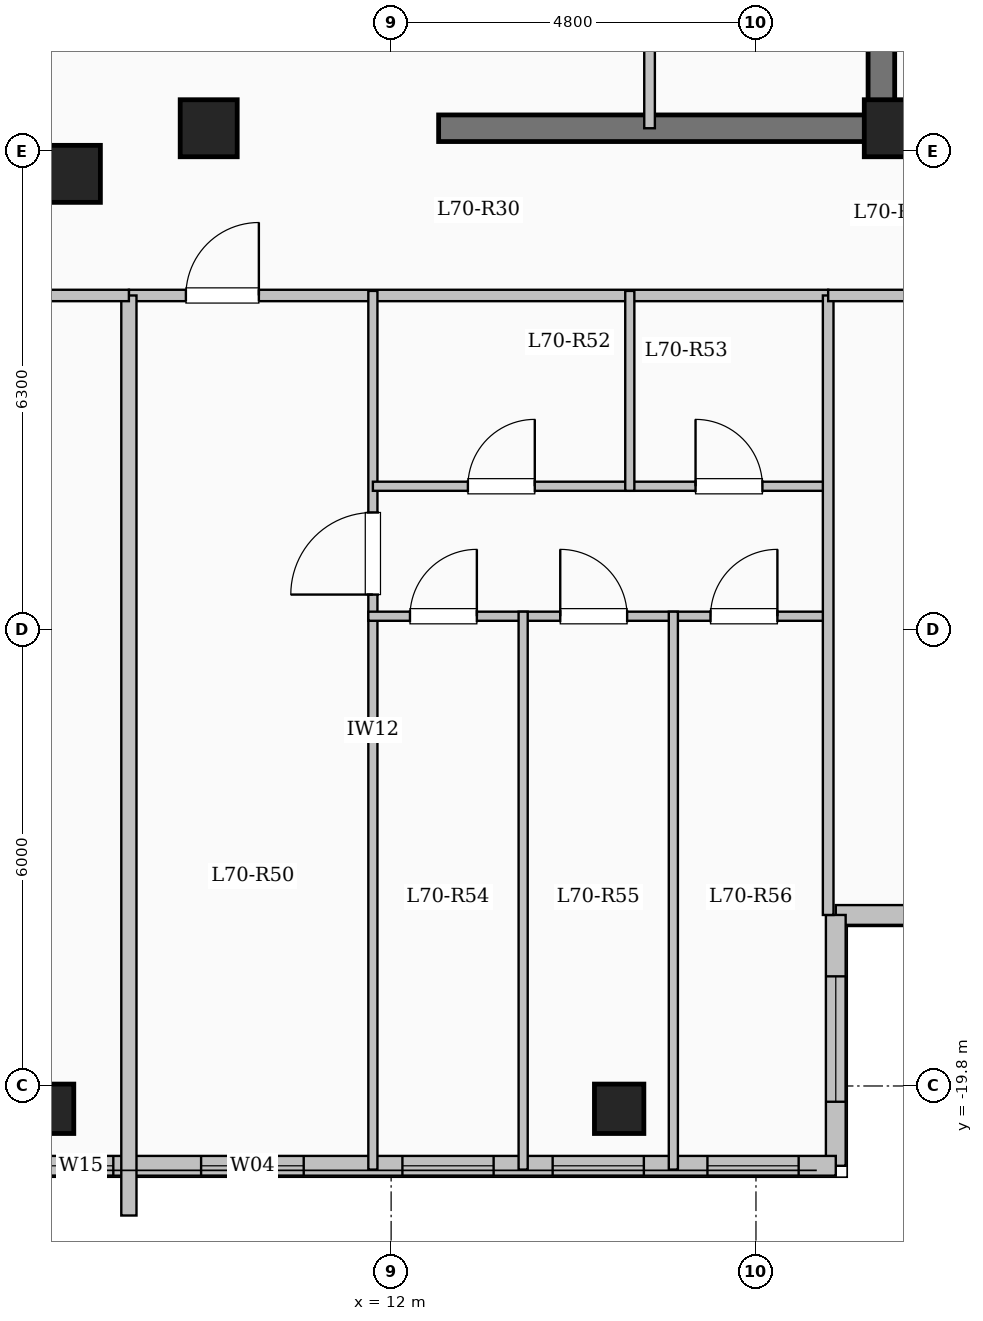
"""IFC4 building model, lengths in metres.
Left out: names, types, materials, properties, quantities, classifications, styles, units other than length and angle.
Written with IfcOpenShell. Run it as: python <this file> out.ifc"""

import sys

from ifc_helpers import new_model, si_unit, direction, frame, frame_2d, origin, origin_2d, place, context, subcontext, project, spatial, rectangle, extrude, element, fill, save


model = new_model("IFC4")
c1 = context("Model", 3, precision=1e-05, world=origin(), true_north=direction((0.0, 1.0)))
c2 = subcontext(c1, "Body", "Model", "MODEL_VIEW")
j1 = project(units=[si_unit("LENGTHUNIT", "METRE"), si_unit("PLANEANGLEUNIT", "RADIAN")], contexts=[c1])
p1 = place(None, origin())
s1 = spatial("IfcSite", under=j1, at=p1, CompositionType="ELEMENT")
p2 = place(p1, origin())
s2 = spatial("IfcBuilding", under=s1, at=p2, CompositionType="ELEMENT")
p3 = place(p2, frame((0.0, 0.0, 258.25)))
s3 = spatial("IfcBuildingStorey", under=s2, at=p3, CompositionType="ELEMENT", Elevation=258.25)
for number, where, z_axis, x_axis in (
    (1, (7.8, -7.8, 0.0), (0.0, 0.0, 1.0), (1.0, 0.0, 0.0)),
    (2, (9.6, -7.2, 0.0), (0.0, 0.0, 1.0), (1.0, 0.0, 0.0)),
    (3, (18.6, -7.2, 0.0), (0.0, 0.0, 1.0), (1.0, 0.0, 0.0)),
):
    element("IfcColumn", number, at=place(p3, frame(where, z_axis=z_axis, x_axis=x_axis)), inside=s3, PredefinedType="COLUMN", context=c2, shape_type="SweptSolid", body=[
        extrude(rectangle(XDim=0.75, YDim=0.75, at=origin_2d()), origin(), (0.0, 0.0, 1.0), 3.35),
    ])
for number, where, z_axis, x_axis in (
    (4, (7.5, -20.1, 0.0), (0.0, 0.0, 1.0), (1.0, 0.0, 0.0)),
    (5, (15.0, -20.1, 0.0), (0.0, 0.0, 1.0), (1.0, 0.0, 0.0)),
):
    element("IfcColumn", number, at=place(p3, frame(where, z_axis=z_axis, x_axis=x_axis)), inside=s3, PredefinedType="COLUMN", context=c2, shape_type="SweptSolid", body=[
        extrude(rectangle(XDim=0.65, YDim=0.65, at=origin_2d()), origin(), (0.0, 0.0, 1.0), 3.35),
    ])
p4 = place(p3, frame((22.65, -17.55, 0.0), z_axis=(0.0, 0.0, 1.0), x_axis=(-1.0, 0.0, 0.0)))
e6 = element("IfcWall", 6, at=p4, inside=s3, PredefinedType="SOLIDWALL", context=c2, shape_type="SweptSolid", body=[
    extrude(rectangle(XDim=4.8, YDim=0.26, at=frame_2d((2.4, 0.0))), origin(), (0.0, 0.0, 1.0), 3.1),
])
p5 = place(p4, frame((1.325, 0.0, 0.9)))
e7 = element("IfcOpeningElement", 7, at=p5, cuts=e6, PredefinedType="OPENING", context=c2, shape_type="SweptSolid", body=[
    extrude(rectangle(XDim=2.2, YDim=1.75, at=frame_2d((1.1, 0.875))), frame((0.0, 0.14, 0.0), z_axis=(0.0, -1.0, 0.0), x_axis=(1.0, 0.0, 0.0)), (0.0, 0.0, 1.0), 0.28),
])
p6 = place(p3, frame((17.85, -17.55, 0.0), z_axis=(0.0, 0.0, 1.0), x_axis=(0.0, -1.0, 0.0)))
e8 = element("IfcWall", 8, at=p6, inside=s3, PredefinedType="SOLIDWALL", context=c2, shape_type="SweptSolid", body=[
    extrude(rectangle(XDim=3.3, YDim=0.26, at=frame_2d((1.65, 0.0))), origin(), (0.0, 0.0, 1.0), 3.1),
])
p7 = place(p6, frame((0.808, 0.0, 0.9)))
e9 = element("IfcOpeningElement", 9, at=p7, cuts=e8, PredefinedType="OPENING", context=c2, shape_type="SweptSolid", body=[
    extrude(rectangle(XDim=1.65, YDim=1.6, at=frame_2d((0.825, 0.8))), frame((0.0, 0.14, 0.0), z_axis=(0.0, -1.0, 0.0), x_axis=(1.0, 0.0, 0.0)), (0.0, 0.0, 1.0), 0.28),
])
p8 = place(p3, frame((17.85, -20.85, 0.0), z_axis=(0.0, 0.0, 1.0), x_axis=(-1.0, 0.0, 0.0)))
e10 = element("IfcWall", 10, at=p8, inside=s3, PredefinedType="SOLIDWALL", context=c2, shape_type="SweptSolid", body=[
    extrude(rectangle(XDim=10.5, YDim=0.26, at=frame_2d((5.25, 0.0))), origin(), (0.0, 0.0, 1.0), 3.1),
])
p9 = place(p8, frame((0.489, 0.0, 0.95)))
e11 = element("IfcOpeningElement", 11, at=p9, cuts=e10, PredefinedType="OPENING", context=c2, shape_type="SweptSolid", body=[
    extrude(rectangle(XDim=1.2, YDim=1.5, at=frame_2d((0.6, 0.75))), frame((0.0, 0.14, 0.0), z_axis=(0.0, -1.0, 0.0), x_axis=(1.0, 0.0, 0.0)), (0.0, 0.0, 1.0), 0.28),
])
p10 = place(p8, frame((2.525, 0.0, 0.95)))
e12 = element("IfcOpeningElement", 12, at=p10, cuts=e10, PredefinedType="OPENING", context=c2, shape_type="SweptSolid", body=[
    extrude(rectangle(XDim=1.2, YDim=1.5, at=frame_2d((0.6, 0.75))), frame((0.0, 0.14, 0.0), z_axis=(0.0, -1.0, 0.0), x_axis=(1.0, 0.0, 0.0)), (0.0, 0.0, 1.0), 0.28),
])
p11 = place(p8, frame((4.501, 0.0, 0.95)))
e13 = element("IfcOpeningElement", 13, at=p11, cuts=e10, PredefinedType="OPENING", context=c2, shape_type="SweptSolid", body=[
    extrude(rectangle(XDim=1.2, YDim=1.5, at=frame_2d((0.6, 0.75))), frame((0.0, 0.14, 0.0), z_axis=(0.0, -1.0, 0.0), x_axis=(1.0, 0.0, 0.0)), (0.0, 0.0, 1.0), 0.28),
])
p12 = place(p8, frame((7.0, 0.0, 0.95)))
e14 = element("IfcOpeningElement", 14, at=p12, cuts=e10, PredefinedType="OPENING", context=c2, shape_type="SweptSolid", body=[
    extrude(rectangle(XDim=1.35, YDim=1.55, at=frame_2d((0.675, 0.775))), frame((0.0, 0.14, 0.0), z_axis=(0.0, -1.0, 0.0), x_axis=(1.0, 0.0, 0.0)), (0.0, 0.0, 1.0), 0.28),
])
p13 = place(p8, frame((9.505, 0.0, 0.95)))
e15 = element("IfcOpeningElement", 15, at=p13, cuts=e10, PredefinedType="OPENING", context=c2, shape_type="SweptSolid", body=[
    extrude(rectangle(XDim=0.85, YDim=1.5, at=frame_2d((0.425, 0.75))), frame((0.0, 0.14, 0.0), z_axis=(0.0, -1.0, 0.0), x_axis=(1.0, 0.0, 0.0)), (0.0, 0.0, 1.0), 0.28),
])
p14 = place(p3, frame((18.45, -7.375, 0.0), z_axis=(0.0, 0.0, 1.0), x_axis=(0.0, 1.0, 0.0)))
e16 = element("IfcWall", 16, at=p14, inside=s3, PredefinedType="SHEAR", context=c2, shape_type="SweptSolid", body=[
    extrude(rectangle(XDim=14.05, YDim=0.35, at=frame_2d((7.025, 0.0))), origin(), (0.0, 0.0, 1.0), 3.35),
])
p15 = place(p3, frame((12.625, -7.2, 0.0), z_axis=(0.0, 0.0, 1.0), x_axis=(1.0, 0.0, 0.0)))
e17 = element("IfcWall", 17, at=p15, inside=s3, PredefinedType="SHEAR", context=c2, shape_type="SweptSolid", body=[
    extrude(rectangle(XDim=6.0, YDim=0.35, at=frame_2d((3.0, 0.0))), origin(), (0.0, 0.0, 1.0), 3.35),
])
p16 = place(p3, frame((15.4, -7.2, 0.0), z_axis=(0.0, 0.0, 1.0), x_axis=(0.0, 1.0, 0.0)))
e18 = element("IfcWall", 18, at=p16, inside=s3, PredefinedType="PARTITIONING", context=c2, shape_type="SweptSolid", body=[
    extrude(rectangle(XDim=10.45, YDim=0.14, at=frame_2d((5.225, 0.0))), origin(), (0.0, 0.0, 1.0), 3.1),
])
p17 = place(p16, frame((9.25, 0.0, 0.0)))
e19 = element("IfcOpeningElement", 19, at=p17, cuts=e18, PredefinedType="OPENING", context=c2, shape_type="SweptSolid", body=[
    extrude(rectangle(XDim=0.9, YDim=2.08, at=frame_2d((0.45, 1.04))), frame((0.0, 0.08, 0.0), z_axis=(0.0, -1.0, 0.0), x_axis=(1.0, 0.0, 0.0)), (0.0, 0.0, 1.0), 0.16),
])
p18 = place(p3, frame((8.55, -9.4, 0.0), z_axis=(0.0, 0.0, 1.0), x_axis=(1.0, 0.0, 0.0)))
e20 = element("IfcWall", 20, at=p18, inside=s3, PredefinedType="PARTITIONING", context=c2, shape_type="SweptSolid", body=[
    extrude(rectangle(XDim=9.2, YDim=0.15, at=frame_2d((4.6, 0.0))), origin(), (0.0, 0.0, 1.0), 3.1),
])
p19 = place(p18, frame((0.75, 0.0, 0.0)))
e21 = element("IfcOpeningElement", 21, at=p19, cuts=e20, PredefinedType="OPENING", context=c2, shape_type="SweptSolid", body=[
    extrude(rectangle(XDim=0.96, YDim=2.15, at=frame_2d((0.48, 1.075))), frame((0.0, 0.085, 0.0), z_axis=(0.0, -1.0, 0.0), x_axis=(1.0, 0.0, 0.0)), (0.0, 0.0, 1.0), 0.17),
])
p20 = place(p3, frame((11.76, -20.9, 0.0), z_axis=(0.0, 0.0, 1.0), x_axis=(0.0, 1.0, 0.0)))
e22 = element("IfcWall", 22, at=p20, inside=s3, PredefinedType="PARTITIONING", context=c2, shape_type="SweptSolid", body=[
    extrude(rectangle(XDim=11.56, YDim=0.12, at=frame_2d((5.78, 0.0))), origin(), (0.0, 0.0, 1.0), 3.1),
])
p21 = place(p20, frame((7.565, 0.0, 0.0)))
e23 = element("IfcOpeningElement", 23, at=p21, cuts=e22, PredefinedType="OPENING", context=c2, shape_type="SweptSolid", body=[
    extrude(rectangle(XDim=1.08, YDim=2.15, at=frame_2d((0.54, 1.075))), frame((0.0, 0.07, 0.0), z_axis=(0.0, -1.0, 0.0), x_axis=(1.0, 0.0, 0.0)), (0.0, 0.0, 1.0), 0.14),
])
p22 = place(p3, frame((11.76, -11.91, 0.0), z_axis=(0.0, 0.0, 1.0), x_axis=(1.0, 0.0, 0.0)))
e24 = element("IfcWall", 24, at=p22, inside=s3, PredefinedType="PARTITIONING", context=c2, shape_type="SweptSolid", body=[
    extrude(rectangle(XDim=3.38, YDim=0.12, at=frame_2d((1.69, 0.0))), origin(), (0.0, 0.0, 1.0), 3.1),
])
p23 = place(p22, frame((1.25, 0.0, 0.0)))
e25 = element("IfcOpeningElement", 25, at=p23, cuts=e24, PredefinedType="OPENING", context=c2, shape_type="SweptSolid", body=[
    extrude(rectangle(XDim=0.88, YDim=2.1, at=frame_2d((0.44, 1.05))), frame((0.0, 0.07, 0.0), z_axis=(0.0, -1.0, 0.0), x_axis=(1.0, 0.0, 0.0)), (0.0, 0.0, 1.0), 0.14),
])
p24 = place(p3, frame((15.14, -11.91, 0.0), z_axis=(0.0, 0.0, 1.0), x_axis=(1.0, 0.0, 0.0)))
e26 = element("IfcWall", 26, at=p24, inside=s3, PredefinedType="PARTITIONING", context=c2, shape_type="SweptSolid", body=[
    extrude(rectangle(XDim=2.61, YDim=0.12, at=frame_2d((1.305, 0.0))), origin(), (0.0, 0.0, 1.0), 3.1),
])
p25 = place(p24, frame((0.865, 0.0, 0.0)))
e27 = element("IfcOpeningElement", 27, at=p25, cuts=e26, PredefinedType="OPENING", context=c2, shape_type="SweptSolid", body=[
    extrude(rectangle(XDim=0.88, YDim=2.1, at=frame_2d((0.44, 1.05))), frame((0.0, 0.07, 0.0), z_axis=(0.0, -1.0, 0.0), x_axis=(1.0, 0.0, 0.0)), (0.0, 0.0, 1.0), 0.14),
])
p26 = place(p3, frame((11.7, -13.62, 0.0), z_axis=(0.0, 0.0, 1.0), x_axis=(1.0, 0.0, 0.0)))
e28 = element("IfcWall", 28, at=p26, inside=s3, PredefinedType="PARTITIONING", context=c2, shape_type="SweptSolid", body=[
    extrude(rectangle(XDim=6.11, YDim=0.12, at=frame_2d((3.055, 0.0))), origin(), (0.0, 0.0, 1.0), 3.1),
])
p27 = place(p26, frame((0.548, 0.0, 0.0)))
e29 = element("IfcOpeningElement", 29, at=p27, cuts=e28, PredefinedType="OPENING", context=c2, shape_type="SweptSolid", body=[
    extrude(rectangle(XDim=0.88, YDim=2.1, at=frame_2d((0.44, 1.05))), frame((0.0, 0.07, 0.0), z_axis=(0.0, -1.0, 0.0), x_axis=(1.0, 0.0, 0.0)), (0.0, 0.0, 1.0), 0.14),
])
p28 = place(p26, frame((2.525, 0.0, 0.0)))
e30 = element("IfcOpeningElement", 30, at=p28, cuts=e28, PredefinedType="OPENING", context=c2, shape_type="SweptSolid", body=[
    extrude(rectangle(XDim=0.88, YDim=2.1, at=frame_2d((0.44, 1.05))), frame((0.0, 0.07, 0.0), z_axis=(0.0, -1.0, 0.0), x_axis=(1.0, 0.0, 0.0)), (0.0, 0.0, 1.0), 0.14),
])
p29 = place(p26, frame((4.502, 0.0, 0.0)))
e31 = element("IfcOpeningElement", 31, at=p29, cuts=e28, PredefinedType="OPENING", context=c2, shape_type="SweptSolid", body=[
    extrude(rectangle(XDim=0.88, YDim=2.1, at=frame_2d((0.44, 1.05))), frame((0.0, 0.07, 0.0), z_axis=(0.0, -1.0, 0.0), x_axis=(1.0, 0.0, 0.0)), (0.0, 0.0, 1.0), 0.14),
])
p30 = place(p3, frame((15.14, -11.97, 0.0), z_axis=(0.0, 0.0, 1.0), x_axis=(0.0, 1.0, 0.0)))
e32 = element("IfcWall", 32, at=p30, inside=s3, PredefinedType="PARTITIONING", context=c2, shape_type="SweptSolid", body=[
    extrude(rectangle(XDim=2.63, YDim=0.12, at=frame_2d((1.315, 0.0))), origin(), (0.0, 0.0, 1.0), 2.685),
])
for number, where, z_axis, x_axis in (
    (33, (13.737, -20.9, 0.0), (0.0, 0.0, 1.0), (0.0, 1.0, 0.0)),
    (34, (15.713, -20.9, 0.0), (0.0, 0.0, 1.0), (0.0, 1.0, 0.0)),
):
    element("IfcWall", number, at=place(p3, frame(where, z_axis=z_axis, x_axis=x_axis)), inside=s3, PredefinedType="PARTITIONING", context=c2, shape_type="SweptSolid", body=[
        extrude(rectangle(XDim=7.34, YDim=0.12, at=frame_2d((3.67, 0.0))), origin(), (0.0, 0.0, 1.0), 3.1),
    ])
p31 = place(p3, frame((8.55, -21.504, 0.0), z_axis=(0.0, 0.0, 1.0), x_axis=(0.0, 1.0, 0.0)))
e35 = element("IfcWall", 35, at=p31, inside=s3, PredefinedType="SOLIDWALL", context=c2, shape_type="SweptSolid", body=[
    extrude(rectangle(XDim=12.104, YDim=0.2, at=frame_2d((6.052, 0.0))), origin(), (0.0, 0.0, 1.0), 3.1),
])
p32 = place(p3, frame((-8.55, -9.4, 0.0), z_axis=(0.0, 0.0, 1.0), x_axis=(1.0, 0.0, 0.0)))
e36 = element("IfcWall", 36, at=p32, inside=s3, PredefinedType="PARTITIONING", context=c2, shape_type="SweptSolid", body=[
    extrude(rectangle(XDim=17.1, YDim=0.15, at=frame_2d((8.55, 0.0))), origin(), (0.0, 0.0, 1.0), 3.1),
])
p33 = place(p32, frame((1.75, 0.0, 0.0)))
e37 = element("IfcOpeningElement", 37, at=p33, cuts=e36, PredefinedType="OPENING", context=c2, shape_type="SweptSolid", body=[
    extrude(rectangle(XDim=0.95, YDim=2.15, at=frame_2d((0.475, 1.075))), frame((0.0, 0.085, 0.0), z_axis=(0.0, -1.0, 0.0), x_axis=(1.0, 0.0, 0.0)), (0.0, 0.0, 1.0), 0.17),
])
p34 = place(p32, frame((10.5, 0.0, 0.0)))
e38 = element("IfcOpeningElement", 38, at=p34, cuts=e36, PredefinedType="OPENING", context=c2, shape_type="SweptSolid", body=[
    extrude(rectangle(XDim=0.95, YDim=2.15, at=frame_2d((0.475, 1.075))), frame((0.0, 0.085, 0.0), z_axis=(0.0, -1.0, 0.0), x_axis=(1.0, 0.0, 0.0)), (0.0, 0.0, 1.0), 0.17),
])
p35 = place(p3, frame((18.45, -7.25, 0.0), z_axis=(0.0, 0.0, 1.0), x_axis=(1.0, 0.0, 0.0)))
e39 = element("IfcWall", 39, at=p35, inside=s3, PredefinedType="PARTITIONING", context=c2, shape_type="SweptSolid", body=[
    extrude(rectangle(XDim=4.23, YDim=0.15, at=frame_2d((2.115, 0.0))), origin(), (0.0, 0.0, 1.0), 3.1),
])
p36 = place(p35, frame((1.5, 0.0, 0.0)))
e40 = element("IfcOpeningElement", 40, at=p36, cuts=e39, PredefinedType="OPENING", context=c2, shape_type="SweptSolid", body=[
    extrude(rectangle(XDim=1.08, YDim=2.15, at=frame_2d((0.54, 1.075))), frame((0.0, 0.085, 0.0), z_axis=(0.0, -1.0, 0.0), x_axis=(1.0, 0.0, 0.0)), (0.0, 0.0, 1.0), 0.17),
])
p37 = place(p3, frame((17.75, -17.55, 0.0), z_axis=(0.0, 0.0, 1.0), x_axis=(0.0, 1.0, 0.0)))
e41 = element("IfcWall", 41, at=p37, inside=s3, PredefinedType="PARTITIONING", context=c2, shape_type="SweptSolid", body=[
    extrude(rectangle(XDim=8.15, YDim=0.14, at=frame_2d((4.075, 0.0))), origin(), (0.0, 0.0, 1.0), 3.1),
])
p38 = place(p3, frame((17.75, -9.4, 0.0), z_axis=(0.0, 0.0, 1.0), x_axis=(1.0, 0.0, 0.0)))
e42 = element("IfcWall", 42, at=p38, inside=s3, PredefinedType="PARTITIONING", context=c2, shape_type="SweptSolid", body=[
    extrude(rectangle(XDim=4.93, YDim=0.15, at=frame_2d((2.465, 0.0))), origin(), (0.0, 0.0, 1.0), 3.1),
])
p39 = place(p38, frame((1.99, 0.0, 0.0)))
e43 = element("IfcOpeningElement", 43, at=p39, cuts=e42, PredefinedType="OPENING", context=c2, shape_type="SweptSolid", body=[
    extrude(rectangle(XDim=0.95, YDim=2.15, at=frame_2d((0.475, 1.075))), frame((0.0, 0.085, 0.0), z_axis=(0.0, -1.0, 0.0), x_axis=(1.0, 0.0, 0.0)), (0.0, 0.0, 1.0), 0.17),
])
p40 = place(p7, origin())
e44 = element("IfcWindow", 44, at=p40, inside=s3, PartitioningType="SINGLE_PANEL", PredefinedType="WINDOW", context=c2, shape_type="SweptSolid", body=[
    extrude(rectangle(XDim=1.65, YDim=1.6, at=frame_2d((0.825, 0.8))), frame((0.0, 0.03, 0.0), z_axis=(0.0, -1.0, 0.0), x_axis=(1.0, 0.0, 0.0)), (0.0, 0.0, 1.0), 0.06),
])
fill(e9, e44)
p41 = place(p9, origin())
e45 = element("IfcWindow", 45, at=p41, inside=s3, PartitioningType="SINGLE_PANEL", PredefinedType="WINDOW", context=c2, shape_type="SweptSolid", body=[
    extrude(rectangle(XDim=1.2, YDim=1.5, at=frame_2d((0.6, 0.75))), frame((0.0, 0.03, 0.0), z_axis=(0.0, -1.0, 0.0), x_axis=(1.0, 0.0, 0.0)), (0.0, 0.0, 1.0), 0.06),
])
fill(e11, e45)
p42 = place(p10, origin())
e46 = element("IfcWindow", 46, at=p42, inside=s3, PartitioningType="SINGLE_PANEL", PredefinedType="WINDOW", context=c2, shape_type="SweptSolid", body=[
    extrude(rectangle(XDim=1.2, YDim=1.5, at=frame_2d((0.6, 0.75))), frame((0.0, 0.03, 0.0), z_axis=(0.0, -1.0, 0.0), x_axis=(1.0, 0.0, 0.0)), (0.0, 0.0, 1.0), 0.06),
])
fill(e12, e46)
p43 = place(p11, origin())
e47 = element("IfcWindow", 47, at=p43, inside=s3, PartitioningType="SINGLE_PANEL", PredefinedType="WINDOW", context=c2, shape_type="SweptSolid", body=[
    extrude(rectangle(XDim=1.2, YDim=1.5, at=frame_2d((0.6, 0.75))), frame((0.0, 0.03, 0.0), z_axis=(0.0, -1.0, 0.0), x_axis=(1.0, 0.0, 0.0)), (0.0, 0.0, 1.0), 0.06),
])
fill(e13, e47)
p44 = place(p12, origin())
e48 = element("IfcWindow", 48, at=p44, inside=s3, PartitioningType="SINGLE_PANEL", PredefinedType="WINDOW", context=c2, shape_type="SweptSolid", body=[
    extrude(rectangle(XDim=1.35, YDim=1.55, at=frame_2d((0.675, 0.775))), frame((0.0, 0.03, 0.0), z_axis=(0.0, -1.0, 0.0), x_axis=(1.0, 0.0, 0.0)), (0.0, 0.0, 1.0), 0.06),
])
fill(e14, e48)
p45 = place(p13, origin())
e49 = element("IfcWindow", 49, at=p45, inside=s3, PartitioningType="SINGLE_PANEL", PredefinedType="WINDOW", context=c2, shape_type="SweptSolid", body=[
    extrude(rectangle(XDim=0.85, YDim=1.5, at=frame_2d((0.425, 0.75))), frame((0.0, 0.03, 0.0), z_axis=(0.0, -1.0, 0.0), x_axis=(1.0, 0.0, 0.0)), (0.0, 0.0, 1.0), 0.06),
])
fill(e15, e49)
p46 = place(p19, origin())
e50 = element("IfcDoor", 50, at=p46, inside=s3, OperationType="SINGLE_SWING_RIGHT", PredefinedType="DOOR", context=c2, shape_type="SweptSolid", body=[
    extrude(rectangle(XDim=0.96, YDim=2.15, at=frame_2d((0.48, 1.075))), frame((0.0, 0.025, 0.0), z_axis=(0.0, -1.0, 0.0), x_axis=(1.0, 0.0, 0.0)), (0.0, 0.0, 1.0), 0.05),
])
fill(e21, e50)
p47 = place(p21, origin())
e51 = element("IfcDoor", 51, at=p47, inside=s3, OperationType="SINGLE_SWING_LEFT", PredefinedType="DOOR", context=c2, shape_type="SweptSolid", body=[
    extrude(rectangle(XDim=1.08, YDim=2.15, at=frame_2d((0.54, 1.075))), frame((0.0, 0.025, 0.0), z_axis=(0.0, -1.0, 0.0), x_axis=(1.0, 0.0, 0.0)), (0.0, 0.0, 1.0), 0.05),
])
fill(e23, e51)
p48 = place(p23, origin())
e52 = element("IfcDoor", 52, at=p48, inside=s3, OperationType="SINGLE_SWING_RIGHT", PredefinedType="DOOR", context=c2, shape_type="SweptSolid", body=[
    extrude(rectangle(XDim=0.88, YDim=2.1, at=frame_2d((0.44, 1.05))), frame((0.0, 0.025, 0.0), z_axis=(0.0, -1.0, 0.0), x_axis=(1.0, 0.0, 0.0)), (0.0, 0.0, 1.0), 0.05),
])
fill(e25, e52)
p49 = place(p25, origin())
e53 = element("IfcDoor", 53, at=p49, inside=s3, OperationType="SINGLE_SWING_LEFT", PredefinedType="DOOR", context=c2, shape_type="SweptSolid", body=[
    extrude(rectangle(XDim=0.88, YDim=2.1, at=frame_2d((0.44, 1.05))), frame((0.0, 0.025, 0.0), z_axis=(0.0, -1.0, 0.0), x_axis=(1.0, 0.0, 0.0)), (0.0, 0.0, 1.0), 0.05),
])
fill(e27, e53)
p50 = place(p27, origin())
e54 = element("IfcDoor", 54, at=p50, inside=s3, OperationType="SINGLE_SWING_RIGHT", PredefinedType="DOOR", context=c2, shape_type="SweptSolid", body=[
    extrude(rectangle(XDim=0.88, YDim=2.1, at=frame_2d((0.44, 1.05))), frame((0.0, 0.025, 0.0), z_axis=(0.0, -1.0, 0.0), x_axis=(1.0, 0.0, 0.0)), (0.0, 0.0, 1.0), 0.05),
])
fill(e29, e54)
p51 = place(p28, origin())
e55 = element("IfcDoor", 55, at=p51, inside=s3, OperationType="SINGLE_SWING_LEFT", PredefinedType="DOOR", context=c2, shape_type="SweptSolid", body=[
    extrude(rectangle(XDim=0.88, YDim=2.1, at=frame_2d((0.44, 1.05))), frame((0.0, 0.025, 0.0), z_axis=(0.0, -1.0, 0.0), x_axis=(1.0, 0.0, 0.0)), (0.0, 0.0, 1.0), 0.05),
])
fill(e30, e55)
p52 = place(p29, origin())
e56 = element("IfcDoor", 56, at=p52, inside=s3, OperationType="SINGLE_SWING_RIGHT", PredefinedType="DOOR", context=c2, shape_type="SweptSolid", body=[
    extrude(rectangle(XDim=0.88, YDim=2.1, at=frame_2d((0.44, 1.05))), frame((0.0, 0.025, 0.0), z_axis=(0.0, -1.0, 0.0), x_axis=(1.0, 0.0, 0.0)), (0.0, 0.0, 1.0), 0.05),
])
fill(e31, e56)
save(model, sys.argv[1])
